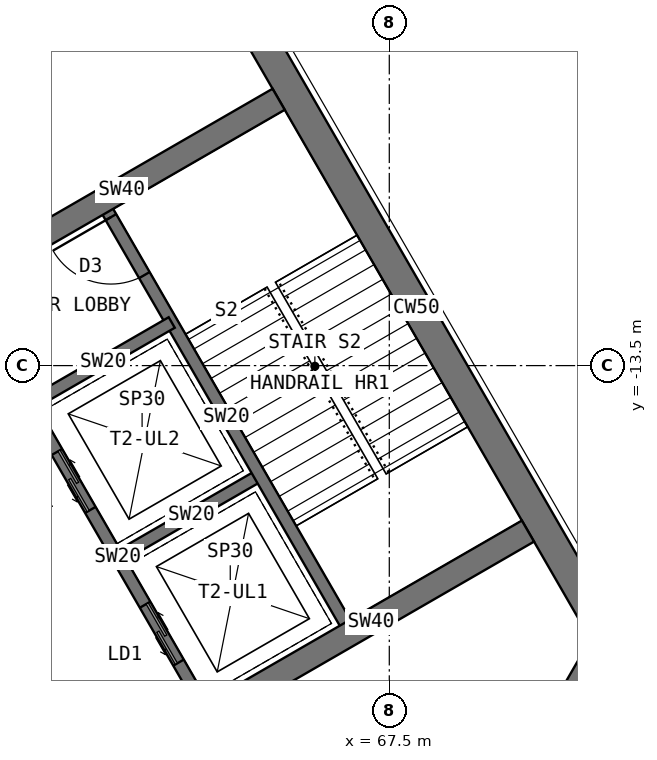
"""IFC4 building model, lengths in metres.
Left out: names, types, materials, properties, quantities, classifications, styles, units other than length and angle.
Written with IfcOpenShell. Run it as: python <this file> out.ifc"""

import sys

from ifc_helpers import new_model, si_unit, direction, frame, frame_2d, origin, place, context, subcontext, project, spatial, rectangle, extrude, element, fill, save


model = new_model("IFC4")
c1 = context("Model", 3, precision=1e-05, world=origin(), true_north=direction((0.0, 1.0)))
c2 = subcontext(c1, "Body", "Model", "MODEL_VIEW")
j1 = project(units=[si_unit("LENGTHUNIT", "METRE"), si_unit("PLANEANGLEUNIT", "RADIAN")], contexts=[c1])
p1 = place(None, origin())
s1 = spatial("IfcSite", under=j1, at=p1, CompositionType="ELEMENT")
p2 = place(p1, origin())
s2 = spatial("IfcBuilding", under=s1, at=p2, CompositionType="ELEMENT")
p3 = place(p2, frame((0.0, 0.0, 238.5)))
s3 = spatial("IfcBuildingStorey", under=s2, at=p3, CompositionType="ELEMENT", Elevation=238.5)
p4 = place(p3, frame((68.822, -21.939, 0.0), z_axis=(0.0, 0.0, 1.0), x_axis=(0.500024481964, 0.866011268655, 0.0)))
e1 = element("IfcWall", 1, at=p4, inside=s3, PredefinedType="SHEAR", context=c2, shape_type="SweptSolid", body=[
    extrude(rectangle(XDim=4.548, YDim=0.5, at=frame_2d((2.274, 0.0))), origin(), (0.0, 0.0, 1.0), 5.0),
])
p5 = place(p3, frame((71.096, -18.0, 0.0), z_axis=(0.0, 0.0, 1.0), x_axis=(-0.500005998175, 0.866021940709, 0.0)))
e2 = element("IfcWall", 2, at=p5, inside=s3, PredefinedType="SHEAR", context=c2, shape_type="SweptSolid", body=[
    extrude(rectangle(XDim=12.596, YDim=0.5, at=frame_2d((6.298, 0.0))), origin(), (0.0, 0.0, 1.0), 5.0),
])
p6 = place(p3, frame((64.484, -19.164, 0.0), z_axis=(0.0, 0.0, 1.0), x_axis=(-0.49999894854, 0.866026010844, 0.0)))
e3 = element("IfcWall", 3, at=p6, inside=s3, PredefinedType="SHEAR", context=c2, shape_type="SweptSolid", body=[
    extrude(rectangle(XDim=8.0, YDim=0.2, at=frame_2d((4.0, 0.0))), origin(), (0.0, 0.0, 1.0), 5.0),
])
p7 = place(p6, frame((6.3, 0.0, 0.0)))
e4 = element("IfcOpeningElement", 4, at=p7, cuts=e3, PredefinedType="OPENING", context=c2, shape_type="SweptSolid", body=[
    extrude(rectangle(XDim=1.2, YDim=2.1, at=frame_2d((0.6, 1.05))), frame((0.0, 0.11, 0.0), z_axis=(0.0, -1.0, 0.0), x_axis=(1.0, 0.0, 0.0)), (0.0, 0.0, 1.0), 0.22),
])
p8 = place(p6, frame((0.9, 0.0, 0.0)))
e5 = element("IfcOpeningElement", 5, at=p8, cuts=e3, PredefinedType="OPENING", context=c2, shape_type="SweptSolid", body=[
    extrude(rectangle(XDim=1.1, YDim=2.2, at=frame_2d((0.55, 1.1))), frame((0.0, 0.11, 0.0), z_axis=(0.0, -1.0, 0.0), x_axis=(1.0, 0.0, 0.0)), (0.0, 0.0, 1.0), 0.22),
])
p9 = place(p6, frame((3.8, 0.0, 0.0)))
e6 = element("IfcOpeningElement", 6, at=p9, cuts=e3, PredefinedType="OPENING", context=c2, shape_type="SweptSolid", body=[
    extrude(rectangle(XDim=1.1, YDim=2.2, at=frame_2d((0.55, 1.1))), frame((0.0, 0.11, 0.0), z_axis=(0.0, -1.0, 0.0), x_axis=(1.0, 0.0, 0.0)), (0.0, 0.0, 1.0), 0.22),
])
p10 = place(p3, frame((63.12, -16.603, 0.0), z_axis=(0.0, 0.0, 1.0), x_axis=(0.866062058628, 0.499936506574, 0.0)))
e7 = element("IfcWall", 7, at=p10, inside=s3, PredefinedType="SHEAR", context=c2, shape_type="SweptSolid", body=[
    extrude(rectangle(XDim=2.6, YDim=0.2, at=frame_2d((1.3, 0.0))), origin(), (0.0, 0.0, 1.0), 5.0),
])
p11 = place(p3, frame((61.67, -14.091, 0.0), z_axis=(0.0, 0.0, 1.0), x_axis=(0.86603858612, 0.49997716683, 0.0)))
e8 = element("IfcWall", 8, at=p11, inside=s3, PredefinedType="SHEAR", context=c2, shape_type="SweptSolid", body=[
    extrude(rectangle(XDim=2.6, YDim=0.2, at=frame_2d((1.3, 0.0))), origin(), (0.0, 0.0, 1.0), 5.0),
])
p12 = place(p3, frame((66.822, -17.814, 0.0), z_axis=(0.0, 0.0, 1.0), x_axis=(-0.49999894854, 0.866026010844, 0.0)))
e9 = element("IfcWall", 9, at=p12, inside=s3, PredefinedType="SHEAR", context=c2, shape_type="SweptSolid", body=[
    extrude(rectangle(XDim=8.0, YDim=0.2, at=frame_2d((4.0, 0.0))), origin(), (0.0, 0.0, 1.0), 5.0),
])
p13 = place(p12, frame((6.7, 0.0, 0.0)))
e10 = element("IfcOpeningElement", 10, at=p13, cuts=e9, PredefinedType="OPENING", context=c2, shape_type="SweptSolid", body=[
    extrude(rectangle(XDim=1.1, YDim=2.1, at=frame_2d((0.55, 1.05))), frame((0.0, 0.11, 0.0), z_axis=(0.0, -1.0, 0.0), x_axis=(1.0, 0.0, 0.0)), (0.0, 0.0, 1.0), 0.22),
])
p14 = place(p3, frame((60.52, -12.099, 0.0), z_axis=(0.0, 0.0, 1.0), x_axis=(0.86602319114, 0.500003832394, 0.0)))
e11 = element("IfcWall", 11, at=p14, inside=s3, PredefinedType="SHEAR", context=c2, shape_type="SweptSolid", body=[
    extrude(rectangle(XDim=5.958, YDim=0.4, at=frame_2d((2.979, 0.0))), origin(), (0.0, 0.0, 1.0), 5.0),
])
p15 = place(p3, frame((64.62, -19.201, 0.0), z_axis=(0.0, 0.0, 1.0), x_axis=(0.866012946976, 0.500021575205, 0.0)))
e12 = element("IfcWall", 12, at=p15, inside=s3, PredefinedType="SHEAR", context=c2, shape_type="SweptSolid", body=[
    extrude(rectangle(XDim=5.958, YDim=0.4, at=frame_2d((2.979, 0.0))), origin(), (0.0, 0.0, 1.0), 5.0),
])
p16 = place(p8, origin())
e13 = element("IfcDoor", 13, at=p16, inside=s3, OperationType="DOUBLE_DOOR_SLIDING", PredefinedType="DOOR", context=c2, shape_type="SweptSolid", body=[
    extrude(rectangle(XDim=1.1, YDim=2.2, at=frame_2d((0.55, 1.1))), frame((0.0, 0.025, 0.0), z_axis=(0.0, -1.0, 0.0), x_axis=(1.0, 0.0, 0.0)), (0.0, 0.0, 1.0), 0.05),
])
fill(e5, e13)
p17 = place(p9, origin())
e14 = element("IfcDoor", 14, at=p17, inside=s3, OperationType="DOUBLE_DOOR_SLIDING", PredefinedType="DOOR", context=c2, shape_type="SweptSolid", body=[
    extrude(rectangle(XDim=1.1, YDim=2.2, at=frame_2d((0.55, 1.1))), frame((0.0, 0.025, 0.0), z_axis=(0.0, -1.0, 0.0), x_axis=(1.0, 0.0, 0.0)), (0.0, 0.0, 1.0), 0.05),
])
fill(e6, e14)
p18 = place(p13, origin())
e15 = element("IfcDoor", 15, at=p18, inside=s3, OperationType="SINGLE_SWING_RIGHT", PredefinedType="DOOR", context=c2, shape_type="SweptSolid", body=[
    extrude(rectangle(XDim=1.1, YDim=2.1, at=frame_2d((0.55, 1.05))), frame((0.0, 0.025, 0.0), z_axis=(0.0, -1.0, 0.0), x_axis=(1.0, 0.0, 0.0)), (0.0, 0.0, 1.0), 0.05),
])
fill(e10, e15)
save(model, sys.argv[1])
